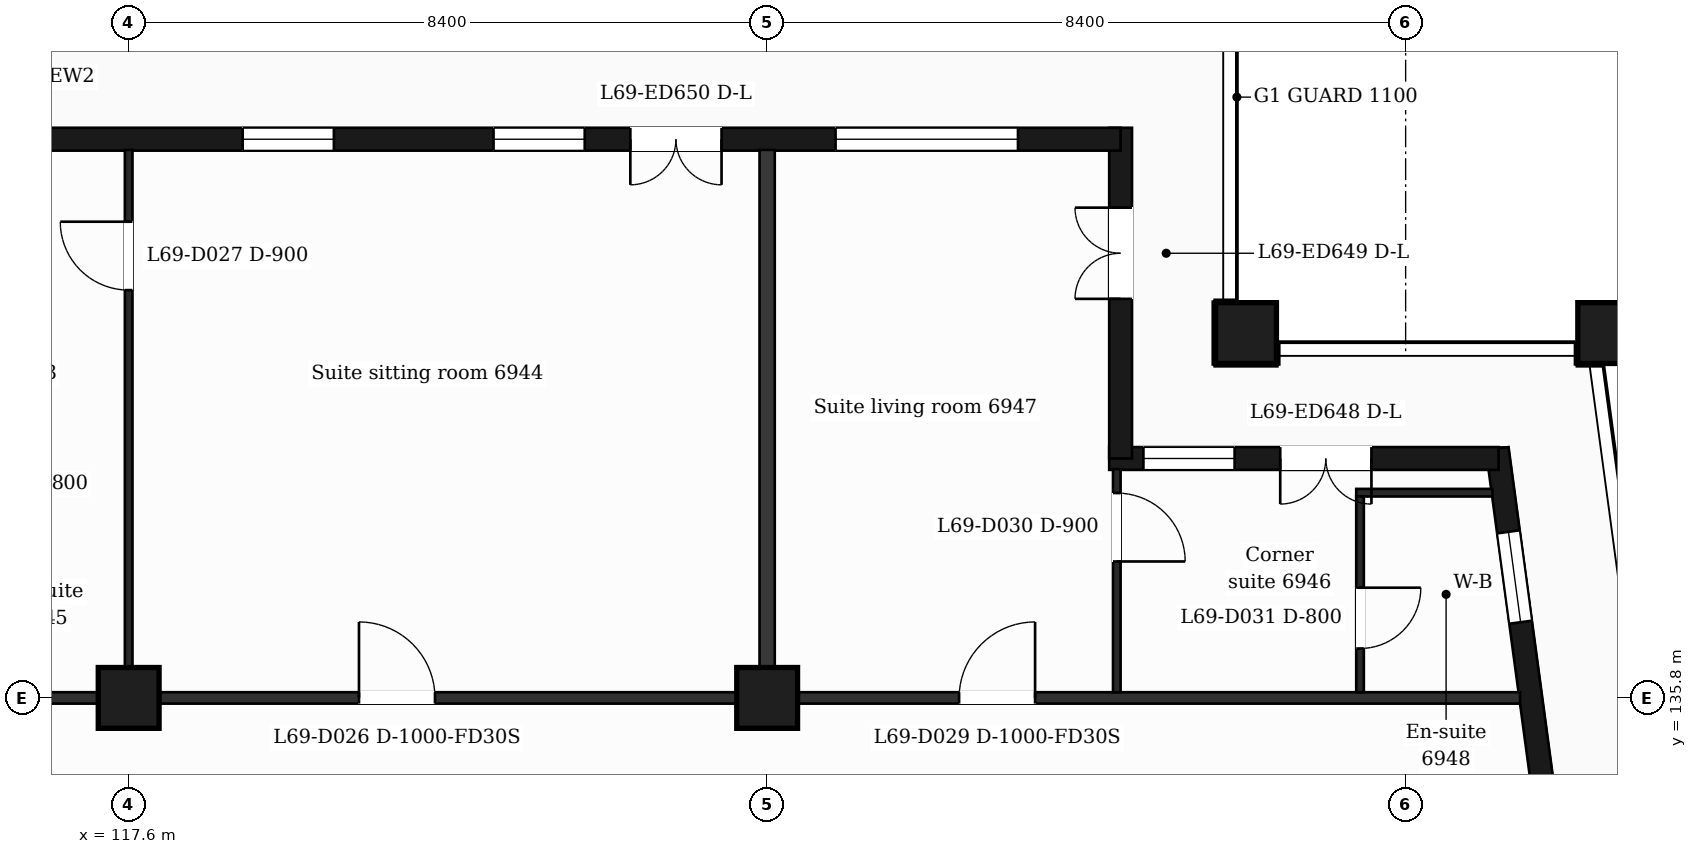
"""IFC4 building model, lengths in metres.
Left out: names, types, materials, properties, quantities, classifications, styles, units other than length and angle.
Written with IfcOpenShell. Run it as: python <this file> out.ifc"""

import sys

from ifc_helpers import new_model, si_unit, direction, frame, frame_2d, origin, origin_2d, place, context, subcontext, project, spatial, rectangle, extrude, element, fill, save


model = new_model("IFC4")
c1 = context("Model", 3, precision=1e-05, world=origin(), true_north=direction((0.0, 1.0)))
c2 = subcontext(c1, "Body", "Model", "MODEL_VIEW")
j1 = project(units=[si_unit("LENGTHUNIT", "METRE"), si_unit("PLANEANGLEUNIT", "RADIAN")], contexts=[c1])
p1 = place(None, origin())
s1 = spatial("IfcSite", under=j1, at=p1, CompositionType="ELEMENT")
p2 = place(p1, origin())
s2 = spatial("IfcBuilding", under=s1, at=p2, CompositionType="ELEMENT")
p3 = place(p2, frame((0.0, 0.0, 284.9)))
s3 = spatial("IfcBuildingStorey", under=s2, at=p3, CompositionType="ELEMENT", Elevation=284.9)
for number, where, z_axis, x_axis in (
    (1, (132.3, 140.6, 0.0), (0.0, 0.0, 1.0), (1.0, 0.0, 0.0)),
    (2, (137.065, 140.6, 0.0), (0.0, 0.0, 1.0), (1.0, 0.0, 0.0)),
    (3, (117.6, 135.8, 0.0), (0.0, 0.0, 1.0), (1.0, 0.0, 0.0)),
    (4, (126.0, 135.8, 0.0), (0.0, 0.0, 1.0), (1.0, 0.0, 0.0)),
):
    element("IfcColumn", number, at=place(p3, frame(where, z_axis=z_axis, x_axis=x_axis)), inside=s3, PredefinedType="COLUMN", context=c2, shape_type="SweptSolid", body=[
        extrude(rectangle(XDim=0.8, YDim=0.8, at=origin_2d()), origin(), (0.0, 0.0, 1.0), 3.7),
    ])
p4 = place(p3, frame((136.504, 132.4, 0.0), z_axis=(0.0, 0.0, 1.0), x_axis=(-0.133399697462, 0.99106231929, 0.0)))
e5 = element("IfcWall", 5, at=p4, inside=s3, PredefinedType="SOLIDWALL", context=c2, shape_type="SweptSolid", body=[
    extrude(rectangle(XDim=6.74, YDim=0.3, at=frame_2d((3.37, 0.0))), origin(), (0.0, 0.0, 1.0), 3.38),
])
p5 = place(p4, frame((1.115, 0.0, 0.0)))
e6 = element("IfcOpeningElement", 6, at=p5, cuts=e5, PredefinedType="OPENING", context=c2, shape_type="SweptSolid", body=[
    extrude(rectangle(XDim=1.2, YDim=2.4, at=frame_2d((0.6, 1.2))), frame((0.0, 0.16, 0.0), z_axis=(0.0, -1.0, 0.0), x_axis=(1.0, 0.0, 0.0)), (0.0, 0.0, 1.0), 0.32),
])
p6 = place(p4, frame((4.436, 0.0, 0.9)))
e7 = element("IfcOpeningElement", 7, at=p6, cuts=e5, PredefinedType="OPENING", context=c2, shape_type="SweptSolid", body=[
    extrude(rectangle(XDim=1.2, YDim=2.1, at=frame_2d((0.6, 1.05))), frame((0.0, 0.16, 0.0), z_axis=(0.0, -1.0, 0.0), x_axis=(1.0, 0.0, 0.0)), (0.0, 0.0, 1.0), 0.32),
])
p7 = place(p3, frame((135.623, 138.95, 0.0), z_axis=(0.0, 0.0, 1.0), x_axis=(-1.0, 0.0, 0.0)))
e8 = element("IfcWall", 8, at=p7, inside=s3, PredefinedType="SOLIDWALL", context=c2, shape_type="SweptSolid", body=[
    extrude(rectangle(XDim=5.123, YDim=0.3, at=frame_2d((2.561, 0.0))), origin(), (0.0, 0.0, 1.0), 3.38),
])
p8 = place(p7, frame((1.673, 0.0, 0.0)))
e9 = element("IfcOpeningElement", 9, at=p8, cuts=e8, PredefinedType="OPENING", context=c2, shape_type="SweptSolid", body=[
    extrude(rectangle(XDim=1.2, YDim=2.4, at=frame_2d((0.6, 1.2))), frame((0.0, 0.16, 0.0), z_axis=(0.0, -1.0, 0.0), x_axis=(1.0, 0.0, 0.0)), (0.0, 0.0, 1.0), 0.32),
])
p9 = place(p7, frame((3.473, 0.0, 0.9)))
e10 = element("IfcOpeningElement", 10, at=p9, cuts=e8, PredefinedType="OPENING", context=c2, shape_type="SweptSolid", body=[
    extrude(rectangle(XDim=1.2, YDim=2.1, at=frame_2d((0.6, 1.05))), frame((0.0, 0.16, 0.0), z_axis=(0.0, -1.0, 0.0), x_axis=(1.0, 0.0, 0.0)), (0.0, 0.0, 1.0), 0.32),
])
p10 = place(p3, frame((130.65, 138.95, 0.0), z_axis=(0.0, 0.0, 1.0), x_axis=(0.0, 1.0, 0.0)))
e11 = element("IfcWall", 11, at=p10, inside=s3, PredefinedType="SOLIDWALL", context=c2, shape_type="SweptSolid", body=[
    extrude(rectangle(XDim=4.35, YDim=0.3, at=frame_2d((2.175, 0.0))), origin(), (0.0, 0.0, 1.0), 3.38),
])
p11 = place(p10, frame((2.1, 0.0, 0.0)))
e12 = element("IfcOpeningElement", 12, at=p11, cuts=e11, PredefinedType="OPENING", context=c2, shape_type="SweptSolid", body=[
    extrude(rectangle(XDim=1.2, YDim=2.4, at=frame_2d((0.6, 1.2))), frame((0.0, 0.16, 0.0), z_axis=(0.0, -1.0, 0.0), x_axis=(1.0, 0.0, 0.0)), (0.0, 0.0, 1.0), 0.32),
])
p12 = place(p3, frame((130.65, 143.15, 0.0), z_axis=(0.0, 0.0, 1.0), x_axis=(-1.0, 0.0, 0.0)))
e13 = element("IfcWall", 13, at=p12, inside=s3, PredefinedType="SOLIDWALL", context=c2, shape_type="SweptSolid", body=[
    extrude(rectangle(XDim=14.25, YDim=0.3, at=frame_2d((7.125, 0.0))), origin(), (0.0, 0.0, 1.0), 3.38),
])
p13 = place(p12, frame((1.35, 0.0, 0.9)))
e14 = element("IfcOpeningElement", 14, at=p13, cuts=e13, PredefinedType="OPENING", context=c2, shape_type="SweptSolid", body=[
    extrude(rectangle(XDim=2.4, YDim=2.1, at=frame_2d((1.2, 1.05))), frame((0.0, 0.16, 0.0), z_axis=(0.0, -1.0, 0.0), x_axis=(1.0, 0.0, 0.0)), (0.0, 0.0, 1.0), 0.32),
])
p14 = place(p12, frame((5.25, 0.0, 0.0)))
e15 = element("IfcOpeningElement", 15, at=p14, cuts=e13, PredefinedType="OPENING", context=c2, shape_type="SweptSolid", body=[
    extrude(rectangle(XDim=1.2, YDim=2.4, at=frame_2d((0.6, 1.2))), frame((0.0, 0.16, 0.0), z_axis=(0.0, -1.0, 0.0), x_axis=(1.0, 0.0, 0.0)), (0.0, 0.0, 1.0), 0.32),
])
p15 = place(p12, frame((7.05, 0.0, 0.9)))
e16 = element("IfcOpeningElement", 16, at=p15, cuts=e13, PredefinedType="OPENING", context=c2, shape_type="SweptSolid", body=[
    extrude(rectangle(XDim=1.2, YDim=2.1, at=frame_2d((0.6, 1.05))), frame((0.0, 0.16, 0.0), z_axis=(0.0, -1.0, 0.0), x_axis=(1.0, 0.0, 0.0)), (0.0, 0.0, 1.0), 0.32),
])
p16 = place(p12, frame((10.35, 0.0, 0.9)))
e17 = element("IfcOpeningElement", 17, at=p16, cuts=e13, PredefinedType="OPENING", context=c2, shape_type="SweptSolid", body=[
    extrude(rectangle(XDim=1.2, YDim=2.1, at=frame_2d((0.6, 1.05))), frame((0.0, 0.16, 0.0), z_axis=(0.0, -1.0, 0.0), x_axis=(1.0, 0.0, 0.0)), (0.0, 0.0, 1.0), 0.32),
])
p17 = place(p3, frame((90.895, 135.8, 0.0), z_axis=(0.0, 0.0, 1.0), x_axis=(1.0, 0.0, 0.0)))
e18 = element("IfcWall", 18, at=p17, inside=s3, PredefinedType="PARTITIONING", context=c2, shape_type="SweptSolid", body=[
    extrude(rectangle(XDim=45.011, YDim=0.15, at=frame_2d((22.505, 0.0))), origin(), (0.0, 0.0, 1.0), 3.38),
])
p18 = place(p17, frame((8.005, 0.0, 0.0)))
e19 = element("IfcOpeningElement", 19, at=p18, cuts=e18, PredefinedType="OPENING", context=c2, shape_type="SweptSolid", body=[
    extrude(rectangle(XDim=1.0, YDim=2.1, at=frame_2d((0.5, 1.05))), frame((0.0, 0.085, 0.0), z_axis=(0.0, -1.0, 0.0), x_axis=(1.0, 0.0, 0.0)), (0.0, 0.0, 1.0), 0.17),
])
p19 = place(p17, frame((13.605, 0.0, 0.0)))
e20 = element("IfcOpeningElement", 20, at=p19, cuts=e18, PredefinedType="OPENING", context=c2, shape_type="SweptSolid", body=[
    extrude(rectangle(XDim=1.0, YDim=2.1, at=frame_2d((0.5, 1.05))), frame((0.0, 0.085, 0.0), z_axis=(0.0, -1.0, 0.0), x_axis=(1.0, 0.0, 0.0)), (0.0, 0.0, 1.0), 0.17),
])
p20 = place(p17, frame((29.735, 0.0, 0.0)))
e21 = element("IfcOpeningElement", 21, at=p20, cuts=e18, PredefinedType="OPENING", context=c2, shape_type="SweptSolid", body=[
    extrude(rectangle(XDim=1.0, YDim=2.1, at=frame_2d((0.5, 1.05))), frame((0.0, 0.085, 0.0), z_axis=(0.0, -1.0, 0.0), x_axis=(1.0, 0.0, 0.0)), (0.0, 0.0, 1.0), 0.17),
])
p21 = place(p17, frame((37.63, 0.0, 0.0)))
e22 = element("IfcOpeningElement", 22, at=p21, cuts=e18, PredefinedType="OPENING", context=c2, shape_type="SweptSolid", body=[
    extrude(rectangle(XDim=1.0, YDim=2.1, at=frame_2d((0.5, 1.05))), frame((0.0, 0.085, 0.0), z_axis=(0.0, -1.0, 0.0), x_axis=(1.0, 0.0, 0.0)), (0.0, 0.0, 1.0), 0.17),
])
p22 = place(p3, frame((133.75, 138.5, 0.0), z_axis=(0.0, 0.0, 1.0), x_axis=(1.0, 0.0, 0.0)))
e23 = element("IfcWall", 23, at=p22, inside=s3, PredefinedType="PARTITIONING", context=c2, shape_type="SweptSolid", body=[
    extrude(rectangle(XDim=1.792, YDim=0.1, at=frame_2d((0.896, 0.0))), origin(), (0.0, 0.0, 1.0), 3.38),
])
p23 = place(p3, frame((117.6, 135.875, 0.0), z_axis=(0.0, 0.0, 1.0), x_axis=(0.0, 1.0, 0.0)))
e24 = element("IfcWall", 24, at=p23, inside=s3, PredefinedType="PARTITIONING", context=c2, shape_type="SweptSolid", body=[
    extrude(rectangle(XDim=7.135, YDim=0.1, at=frame_2d((3.567, 0.0))), origin(), (0.0, 0.0, 1.0), 3.38),
])
p24 = place(p23, frame((5.29, 0.0, 0.0)))
e25 = element("IfcOpeningElement", 25, at=p24, cuts=e24, PredefinedType="OPENING", context=c2, shape_type="SweptSolid", body=[
    extrude(rectangle(XDim=0.9, YDim=2.1, at=frame_2d((0.45, 1.05))), frame((0.0, 0.06, 0.0), z_axis=(0.0, -1.0, 0.0), x_axis=(1.0, 0.0, 0.0)), (0.0, 0.0, 1.0), 0.12),
])
p25 = place(p3, frame((126.0, 135.875, 0.0), z_axis=(0.0, 0.0, 1.0), x_axis=(0.0, 1.0, 0.0)))
e26 = element("IfcWall", 26, at=p25, inside=s3, PredefinedType="PARTITIONING", context=c2, shape_type="SweptSolid", body=[
    extrude(rectangle(XDim=7.135, YDim=0.2, at=frame_2d((3.567, 0.0))), origin(), (0.0, 0.0, 1.0), 3.38),
])
p26 = place(p3, frame((130.6, 135.875, 0.0), z_axis=(0.0, 0.0, 1.0), x_axis=(0.0, 1.0, 0.0)))
e27 = element("IfcWall", 27, at=p26, inside=s3, PredefinedType="PARTITIONING", context=c2, shape_type="SweptSolid", body=[
    extrude(rectangle(XDim=2.935, YDim=0.1, at=frame_2d((1.468, 0.0))), origin(), (0.0, 0.0, 1.0), 3.38),
])
p27 = place(p26, frame((1.72, 0.0, 0.0)))
e28 = element("IfcOpeningElement", 28, at=p27, cuts=e27, PredefinedType="OPENING", context=c2, shape_type="SweptSolid", body=[
    extrude(rectangle(XDim=0.9, YDim=2.1, at=frame_2d((0.45, 1.05))), frame((0.0, 0.06, 0.0), z_axis=(0.0, -1.0, 0.0), x_axis=(1.0, 0.0, 0.0)), (0.0, 0.0, 1.0), 0.12),
])
p28 = place(p3, frame((133.8, 135.875, 0.0), z_axis=(0.0, 0.0, 1.0), x_axis=(0.0, 1.0, 0.0)))
e29 = element("IfcWall", 29, at=p28, inside=s3, PredefinedType="PARTITIONING", context=c2, shape_type="SweptSolid", body=[
    extrude(rectangle(XDim=2.575, YDim=0.1, at=frame_2d((1.288, 0.0))), origin(), (0.0, 0.0, 1.0), 3.38),
])
p29 = place(p28, frame((0.575, 0.0, 0.0)))
e30 = element("IfcOpeningElement", 30, at=p29, cuts=e29, PredefinedType="OPENING", context=c2, shape_type="SweptSolid", body=[
    extrude(rectangle(XDim=0.8, YDim=2.1, at=frame_2d((0.4, 1.05))), frame((0.0, 0.06, 0.0), z_axis=(0.0, -1.0, 0.0), x_axis=(1.0, 0.0, 0.0)), (0.0, 0.0, 1.0), 0.12),
])
p30 = place(p6, origin())
e31 = element("IfcWindow", 31, at=p30, inside=s3, PartitioningType="SINGLE_PANEL", PredefinedType="WINDOW", context=c2, shape_type="SweptSolid", body=[
    extrude(rectangle(XDim=1.2, YDim=2.1, at=frame_2d((0.6, 1.05))), frame((0.0, 0.03, 0.0), z_axis=(0.0, -1.0, 0.0), x_axis=(1.0, 0.0, 0.0)), (0.0, 0.0, 1.0), 0.06),
])
fill(e7, e31)
p31 = place(p8, origin())
e32 = element("IfcDoor", 32, at=p31, inside=s3, OperationType="DOUBLE_DOOR_SINGLE_SWING", PredefinedType="DOOR", context=c2, shape_type="SweptSolid", body=[
    extrude(rectangle(XDim=1.2, YDim=2.4, at=frame_2d((0.6, 1.2))), frame((0.0, 0.025, 0.0), z_axis=(0.0, -1.0, 0.0), x_axis=(1.0, 0.0, 0.0)), (0.0, 0.0, 1.0), 0.05),
])
fill(e9, e32)
p32 = place(p9, origin())
e33 = element("IfcWindow", 33, at=p32, inside=s3, PartitioningType="SINGLE_PANEL", PredefinedType="WINDOW", context=c2, shape_type="SweptSolid", body=[
    extrude(rectangle(XDim=1.2, YDim=2.1, at=frame_2d((0.6, 1.05))), frame((0.0, 0.03, 0.0), z_axis=(0.0, -1.0, 0.0), x_axis=(1.0, 0.0, 0.0)), (0.0, 0.0, 1.0), 0.06),
])
fill(e10, e33)
p33 = place(p11, origin())
e34 = element("IfcDoor", 34, at=p33, inside=s3, OperationType="DOUBLE_DOOR_SINGLE_SWING", PredefinedType="DOOR", context=c2, shape_type="SweptSolid", body=[
    extrude(rectangle(XDim=1.2, YDim=2.4, at=frame_2d((0.6, 1.2))), frame((0.0, 0.025, 0.0), z_axis=(0.0, -1.0, 0.0), x_axis=(1.0, 0.0, 0.0)), (0.0, 0.0, 1.0), 0.05),
])
fill(e12, e34)
p34 = place(p13, origin())
e35 = element("IfcWindow", 35, at=p34, inside=s3, PartitioningType="SINGLE_PANEL", PredefinedType="WINDOW", context=c2, shape_type="SweptSolid", body=[
    extrude(rectangle(XDim=2.4, YDim=2.1, at=frame_2d((1.2, 1.05))), frame((0.0, 0.03, 0.0), z_axis=(0.0, -1.0, 0.0), x_axis=(1.0, 0.0, 0.0)), (0.0, 0.0, 1.0), 0.06),
])
fill(e14, e35)
p35 = place(p14, origin())
e36 = element("IfcDoor", 36, at=p35, inside=s3, OperationType="DOUBLE_DOOR_SINGLE_SWING", PredefinedType="DOOR", context=c2, shape_type="SweptSolid", body=[
    extrude(rectangle(XDim=1.2, YDim=2.4, at=frame_2d((0.6, 1.2))), frame((0.0, 0.025, 0.0), z_axis=(0.0, -1.0, 0.0), x_axis=(1.0, 0.0, 0.0)), (0.0, 0.0, 1.0), 0.05),
])
fill(e15, e36)
p36 = place(p15, origin())
e37 = element("IfcWindow", 37, at=p36, inside=s3, PartitioningType="SINGLE_PANEL", PredefinedType="WINDOW", context=c2, shape_type="SweptSolid", body=[
    extrude(rectangle(XDim=1.2, YDim=2.1, at=frame_2d((0.6, 1.05))), frame((0.0, 0.03, 0.0), z_axis=(0.0, -1.0, 0.0), x_axis=(1.0, 0.0, 0.0)), (0.0, 0.0, 1.0), 0.06),
])
fill(e16, e37)
p37 = place(p16, origin())
e38 = element("IfcWindow", 38, at=p37, inside=s3, PartitioningType="SINGLE_PANEL", PredefinedType="WINDOW", context=c2, shape_type="SweptSolid", body=[
    extrude(rectangle(XDim=1.2, YDim=2.1, at=frame_2d((0.6, 1.05))), frame((0.0, 0.03, 0.0), z_axis=(0.0, -1.0, 0.0), x_axis=(1.0, 0.0, 0.0)), (0.0, 0.0, 1.0), 0.06),
])
fill(e17, e38)
p38 = place(p20, origin())
e39 = element("IfcDoor", 39, at=p38, inside=s3, OperationType="SINGLE_SWING_LEFT", PredefinedType="DOOR", context=c2, shape_type="SweptSolid", body=[
    extrude(rectangle(XDim=1.0, YDim=2.1, at=frame_2d((0.5, 1.05))), frame((0.0, 0.025, 0.0), z_axis=(0.0, -1.0, 0.0), x_axis=(1.0, 0.0, 0.0)), (0.0, 0.0, 1.0), 0.05),
])
fill(e21, e39)
p39 = place(p24, origin())
e40 = element("IfcDoor", 40, at=p39, inside=s3, OperationType="SINGLE_SWING_RIGHT", PredefinedType="DOOR", context=c2, shape_type="SweptSolid", body=[
    extrude(rectangle(XDim=0.9, YDim=2.1, at=frame_2d((0.45, 1.05))), frame((0.0, 0.025, 0.0), z_axis=(0.0, -1.0, 0.0), x_axis=(1.0, 0.0, 0.0)), (0.0, 0.0, 1.0), 0.05),
])
fill(e25, e40)
p40 = place(p21, origin())
e41 = element("IfcDoor", 41, at=p40, inside=s3, OperationType="SINGLE_SWING_RIGHT", PredefinedType="DOOR", context=c2, shape_type="SweptSolid", body=[
    extrude(rectangle(XDim=1.0, YDim=2.1, at=frame_2d((0.5, 1.05))), frame((0.0, 0.025, 0.0), z_axis=(0.0, -1.0, 0.0), x_axis=(1.0, 0.0, 0.0)), (0.0, 0.0, 1.0), 0.05),
])
fill(e22, e41)
p41 = place(p27, origin())
e42 = element("IfcDoor", 42, at=p41, inside=s3, OperationType="SINGLE_SWING_LEFT", PredefinedType="DOOR", context=c2, shape_type="SweptSolid", body=[
    extrude(rectangle(XDim=0.9, YDim=2.1, at=frame_2d((0.45, 1.05))), frame((0.0, 0.025, 0.0), z_axis=(0.0, -1.0, 0.0), x_axis=(1.0, 0.0, 0.0)), (0.0, 0.0, 1.0), 0.05),
])
fill(e28, e42)
p42 = place(p29, origin())
e43 = element("IfcDoor", 43, at=p42, inside=s3, OperationType="SINGLE_SWING_RIGHT", PredefinedType="DOOR", context=c2, shape_type="SweptSolid", body=[
    extrude(rectangle(XDim=0.8, YDim=2.1, at=frame_2d((0.4, 1.05))), frame((0.0, 0.025, 0.0), z_axis=(0.0, -1.0, 0.0), x_axis=(1.0, 0.0, 0.0)), (0.0, 0.0, 1.0), 0.05),
])
fill(e30, e43)
save(model, sys.argv[1])
